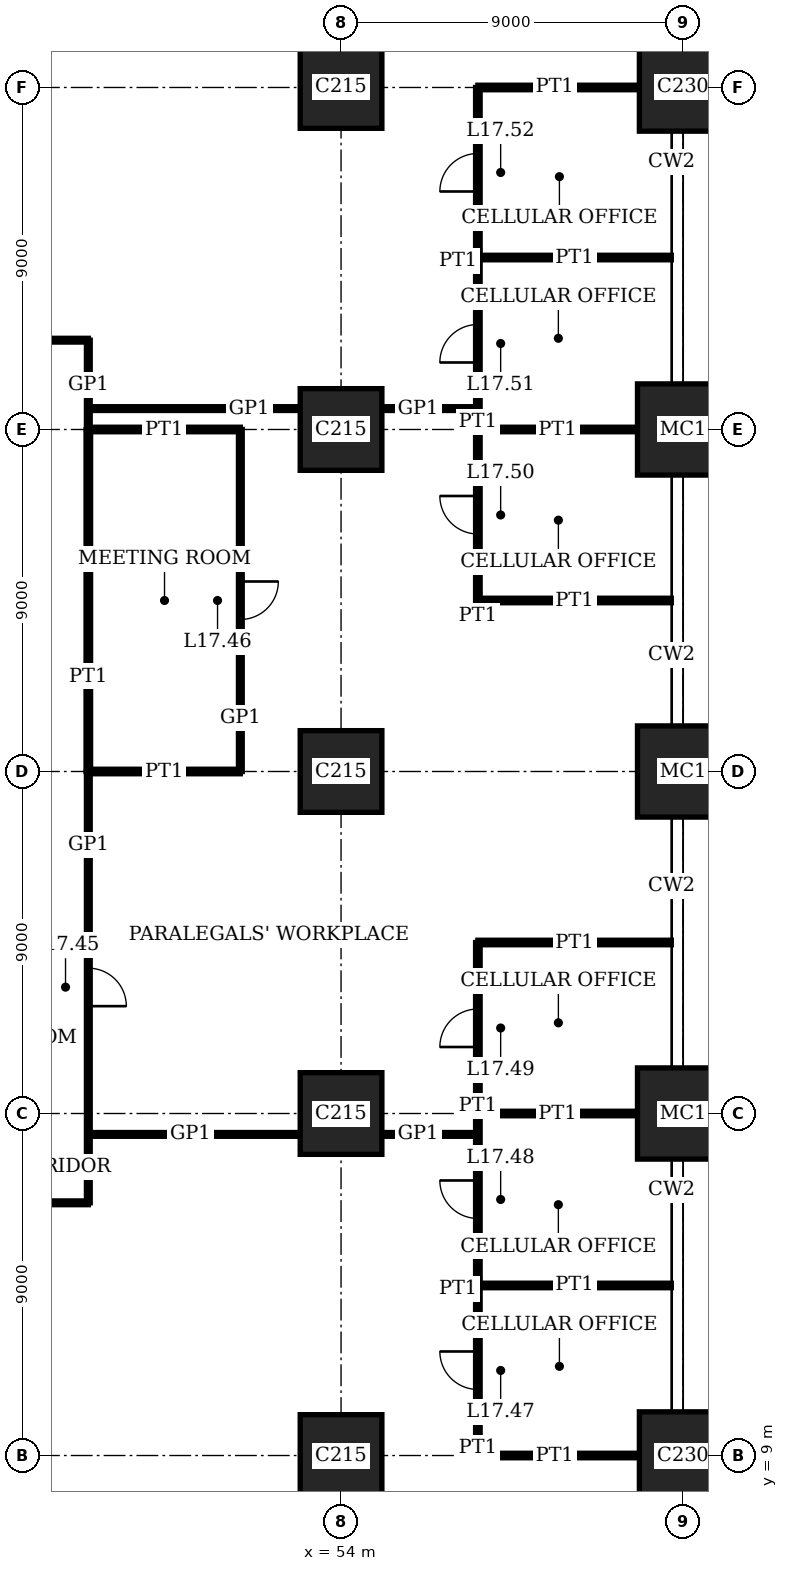
"""IFC4 building model, lengths in metres.
Left out: names, types, materials, properties, quantities, classifications, styles, units other than length and angle.
Written with IfcOpenShell. Run it as: python <this file> out.ifc"""

import sys

from ifc_helpers import new_model, si_unit, direction, frame, frame_2d, origin, origin_2d, place, context, subcontext, project, spatial, rectangle, extrude, element, fill, save


model = new_model("IFC4")
c1 = context("Model", 3, precision=1e-05, world=origin(), true_north=direction((0.0, 1.0)))
c2 = subcontext(c1, "Body", "Model", "MODEL_VIEW")
j1 = project(units=[si_unit("LENGTHUNIT", "METRE"), si_unit("PLANEANGLEUNIT", "RADIAN")], contexts=[c1])
p1 = place(None, origin())
s1 = spatial("IfcSite", under=j1, at=p1, CompositionType="ELEMENT")
p2 = place(p1, origin())
s2 = spatial("IfcBuilding", under=s1, at=p2, CompositionType="ELEMENT")
p3 = place(p2, frame((0.0, 0.0, 71.8)))
s3 = spatial("IfcBuildingStorey", under=s2, at=p3, CompositionType="ELEMENT", Elevation=71.8)
for number, where, z_axis, x_axis in (
    (1, (54.0, 9.0, 0.0), (0.0, 0.0, 1.0), (1.0, 0.0, 0.0)),
    (2, (54.0, 18.0, 0.0), (0.0, 0.0, 1.0), (1.0, 0.0, 0.0)),
    (3, (54.0, 27.0, 0.0), (0.0, 0.0, 1.0), (1.0, 0.0, 0.0)),
    (4, (54.0, 36.0, 0.0), (0.0, 0.0, 1.0), (1.0, 0.0, 0.0)),
    (5, (54.0, 45.0, 0.0), (0.0, 0.0, 1.0), (1.0, 0.0, 0.0)),
):
    element("IfcColumn", number, at=place(p3, frame(where, z_axis=z_axis, x_axis=x_axis)), inside=s3, PredefinedType="COLUMN", context=c2, shape_type="SweptSolid", body=[
        extrude(rectangle(XDim=2.15, YDim=2.15, at=origin_2d()), origin(), (0.0, 0.0, 1.0), 4.0),
    ])
p4 = place(p3, frame((63.0, 9.0, 0.0), z_axis=(0.0, 0.0, 1.0), x_axis=(1.0, 0.0, 0.0)))
e6 = element("IfcColumn", 6, at=p4, inside=s3, PredefinedType="COLUMN", context=c2, shape_type="SweptSolid", body=[
    extrude(rectangle(XDim=2.3, YDim=2.3, at=origin_2d()), origin(), (0.0, 0.0, 1.0), 4.0),
])
for number, where, z_axis, x_axis in (
    (7, (63.0, 18.0, 0.0), (0.0, 0.0, 1.0), (1.0, 0.0, 0.0)),
    (8, (63.0, 27.0, 0.0), (0.0, 0.0, 1.0), (1.0, 0.0, 0.0)),
    (9, (63.0, 36.0, 0.0), (0.0, 0.0, 1.0), (1.0, 0.0, 0.0)),
):
    element("IfcColumn", number, at=place(p3, frame(where, z_axis=z_axis, x_axis=x_axis)), inside=s3, PredefinedType="COLUMN", context=c2, shape_type="SweptSolid", body=[
        extrude(rectangle(XDim=2.4, YDim=2.4, at=origin_2d()), origin(), (0.0, 0.0, 1.0), 4.0),
    ])
p5 = place(p3, frame((63.0, 45.0, 0.0), z_axis=(0.0, 0.0, 1.0), x_axis=(1.0, 0.0, 0.0)))
e10 = element("IfcColumn", 10, at=p5, inside=s3, PredefinedType="COLUMN", context=c2, shape_type="SweptSolid", body=[
    extrude(rectangle(XDim=2.3, YDim=2.3, at=origin_2d()), origin(), (0.0, 0.0, 1.0), 4.0),
])
p6 = place(p3, frame((57.6, 9.0, 0.0), z_axis=(0.0, 0.0, 1.0), x_axis=(1.0, 0.0, 0.0)))
e11 = element("IfcWall", 11, at=p6, inside=s3, PredefinedType="PARTITIONING", context=c2, shape_type="SweptSolid", body=[
    extrude(rectangle(XDim=4.25, YDim=0.12, at=frame_2d((2.125, 0.0))), origin(), (0.0, 0.0, 1.0), 3.05),
])
p7 = place(p3, frame((57.6, 13.475, 0.0), z_axis=(0.0, 0.0, 1.0), x_axis=(1.0, 0.0, 0.0)))
e12 = element("IfcWall", 12, at=p7, inside=s3, PredefinedType="PARTITIONING", context=c2, shape_type="SweptSolid", body=[
    extrude(rectangle(XDim=5.09, YDim=0.12, at=frame_2d((2.545, 0.0))), origin(), (0.0, 0.0, 1.0), 3.1),
])
p8 = place(p3, frame((31.5, 15.65, 0.0), z_axis=(0.0, 0.0, 1.0), x_axis=(1.0, 0.0, 0.0)))
e13 = element("IfcWall", 13, at=p8, inside=s3, PredefinedType="PARTITIONING", context=c2, shape_type="SweptSolid", body=[
    extrude(rectangle(XDim=15.85, YDim=0.1, at=frame_2d((7.925, 0.0))), origin(), (0.0, 0.0, 1.0), 3.75),
])
p9 = place(p3, frame((47.35, 17.45, 0.0), z_axis=(0.0, 0.0, 1.0), x_axis=(1.0, 0.0, 0.0)))
e14 = element("IfcWall", 14, at=p9, inside=s3, PredefinedType="PARTITIONING", context=c2, shape_type="SweptSolid", body=[
    extrude(rectangle(XDim=5.575, YDim=0.1, at=frame_2d((2.788, 0.0))), origin(), (0.0, 0.0, 1.0), 3.05),
])
p10 = place(p3, frame((55.075, 17.45, 0.0), z_axis=(0.0, 0.0, 1.0), x_axis=(1.0, 0.0, 0.0)))
e15 = element("IfcWall", 15, at=p10, inside=s3, PredefinedType="PARTITIONING", context=c2, shape_type="SweptSolid", body=[
    extrude(rectangle(XDim=2.535, YDim=0.1, at=frame_2d((1.268, 0.0))), origin(), (0.0, 0.0, 1.0), 3.05),
])
p11 = place(p3, frame((57.6, 18.0, 0.0), z_axis=(0.0, 0.0, 1.0), x_axis=(1.0, 0.0, 0.0)))
e16 = element("IfcWall", 16, at=p11, inside=s3, PredefinedType="PARTITIONING", context=c2, shape_type="SweptSolid", body=[
    extrude(rectangle(XDim=4.2, YDim=0.12, at=frame_2d((2.1, 0.0))), origin(), (0.0, 0.0, 1.0), 3.05),
])
p12 = place(p3, frame((57.6, 22.5, 0.0), z_axis=(0.0, 0.0, 1.0), x_axis=(1.0, 0.0, 0.0)))
e17 = element("IfcWall", 17, at=p12, inside=s3, PredefinedType="PARTITIONING", context=c2, shape_type="SweptSolid", body=[
    extrude(rectangle(XDim=5.09, YDim=0.12, at=frame_2d((2.545, 0.0))), origin(), (0.0, 0.0, 1.0), 3.1),
])
p13 = place(p3, frame((47.35, 27.0, 0.0), z_axis=(0.0, 0.0, 1.0), x_axis=(1.0, 0.0, 0.0)))
e18 = element("IfcWall", 18, at=p13, inside=s3, PredefinedType="PARTITIONING", context=c2, shape_type="SweptSolid", body=[
    extrude(rectangle(XDim=4.0, YDim=0.12, at=frame_2d((2.0, 0.0))), origin(), (0.0, 0.0, 1.0), 3.05),
])
p14 = place(p3, frame((57.6, 31.5, 0.0), z_axis=(0.0, 0.0, 1.0), x_axis=(1.0, 0.0, 0.0)))
e19 = element("IfcWall", 19, at=p14, inside=s3, PredefinedType="PARTITIONING", context=c2, shape_type="SweptSolid", body=[
    extrude(rectangle(XDim=5.09, YDim=0.12, at=frame_2d((2.545, 0.0))), origin(), (0.0, 0.0, 1.0), 3.1),
])
p15 = place(p3, frame((57.6, 36.0, 0.0), z_axis=(0.0, 0.0, 1.0), x_axis=(1.0, 0.0, 0.0)))
e20 = element("IfcWall", 20, at=p15, inside=s3, PredefinedType="PARTITIONING", context=c2, shape_type="SweptSolid", body=[
    extrude(rectangle(XDim=4.2, YDim=0.12, at=frame_2d((2.1, 0.0))), origin(), (0.0, 0.0, 1.0), 3.05),
])
p16 = place(p3, frame((47.35, 36.0, 0.0), z_axis=(0.0, 0.0, 1.0), x_axis=(1.0, 0.0, 0.0)))
e21 = element("IfcWall", 21, at=p16, inside=s3, PredefinedType="PARTITIONING", context=c2, shape_type="SweptSolid", body=[
    extrude(rectangle(XDim=4.0, YDim=0.12, at=frame_2d((2.0, 0.0))), origin(), (0.0, 0.0, 1.0), 3.05),
])
p17 = place(p3, frame((47.35, 36.55, 0.0), z_axis=(0.0, 0.0, 1.0), x_axis=(1.0, 0.0, 0.0)))
e22 = element("IfcWall", 22, at=p17, inside=s3, PredefinedType="PARTITIONING", context=c2, shape_type="SweptSolid", body=[
    extrude(rectangle(XDim=5.575, YDim=0.1, at=frame_2d((2.788, 0.0))), origin(), (0.0, 0.0, 1.0), 3.05),
])
p18 = place(p3, frame((55.075, 36.55, 0.0), z_axis=(0.0, 0.0, 1.0), x_axis=(1.0, 0.0, 0.0)))
e23 = element("IfcWall", 23, at=p18, inside=s3, PredefinedType="PARTITIONING", context=c2, shape_type="SweptSolid", body=[
    extrude(rectangle(XDim=2.535, YDim=0.1, at=frame_2d((1.268, 0.0))), origin(), (0.0, 0.0, 1.0), 3.05),
])
p19 = place(p3, frame((40.5, 38.35, 0.0), z_axis=(0.0, 0.0, 1.0), x_axis=(1.0, 0.0, 0.0)))
e24 = element("IfcWall", 24, at=p19, inside=s3, PredefinedType="PARTITIONING", context=c2, shape_type="SweptSolid", body=[
    extrude(rectangle(XDim=6.85, YDim=0.1, at=frame_2d((3.425, 0.0))), origin(), (0.0, 0.0, 1.0), 3.75),
])
p20 = place(p3, frame((57.6, 40.525, 0.0), z_axis=(0.0, 0.0, 1.0), x_axis=(1.0, 0.0, 0.0)))
e25 = element("IfcWall", 25, at=p20, inside=s3, PredefinedType="PARTITIONING", context=c2, shape_type="SweptSolid", body=[
    extrude(rectangle(XDim=5.09, YDim=0.12, at=frame_2d((2.545, 0.0))), origin(), (0.0, 0.0, 1.0), 3.1),
])
p21 = place(p3, frame((57.6, 45.0, 0.0), z_axis=(0.0, 0.0, 1.0), x_axis=(1.0, 0.0, 0.0)))
e26 = element("IfcWall", 26, at=p21, inside=s3, PredefinedType="PARTITIONING", context=c2, shape_type="SweptSolid", body=[
    extrude(rectangle(XDim=4.25, YDim=0.12, at=frame_2d((2.125, 0.0))), origin(), (0.0, 0.0, 1.0), 3.05),
])
p22 = place(p3, frame((47.35, 27.0, 0.0), z_axis=(0.0, 0.0, 1.0), x_axis=(0.0, 1.0, 0.0)))
e27 = element("IfcWall", 27, at=p22, inside=s3, PredefinedType="PARTITIONING", context=c2, shape_type="SweptSolid", body=[
    extrude(rectangle(XDim=9.0, YDim=0.12, at=frame_2d((4.5, 0.0))), origin(), (0.0, 0.0, 1.0), 3.75),
])
p23 = place(p3, frame((47.35, 15.65, 0.0), z_axis=(0.0, 0.0, 1.0), x_axis=(0.0, 1.0, 0.0)))
e28 = element("IfcWall", 28, at=p23, inside=s3, PredefinedType="PARTITIONING", context=c2, shape_type="SweptSolid", body=[
    extrude(rectangle(XDim=11.35, YDim=0.1, at=frame_2d((5.675, 0.0))), origin(), (0.0, 0.0, 1.0), 3.75),
])
p24 = place(p23, frame((5.175, 0.0, 0.0)))
e29 = element("IfcOpeningElement", 29, at=p24, cuts=e28, PredefinedType="OPENING", context=c2, shape_type="SweptSolid", body=[
    extrude(rectangle(XDim=1.0, YDim=2.4, at=frame_2d((0.5, 1.2))), frame((0.0, 0.06, 0.0), z_axis=(0.0, -1.0, 0.0), x_axis=(1.0, 0.0, 0.0)), (0.0, 0.0, 1.0), 0.12),
])
p25 = place(p3, frame((47.35, 36.0, 0.0), z_axis=(0.0, 0.0, 1.0), x_axis=(0.0, 1.0, 0.0)))
e30 = element("IfcWall", 30, at=p25, inside=s3, PredefinedType="PARTITIONING", context=c2, shape_type="SweptSolid", body=[
    extrude(rectangle(XDim=2.35, YDim=0.1, at=frame_2d((1.175, 0.0))), origin(), (0.0, 0.0, 1.0), 3.75),
])
p26 = place(p3, frame((51.35, 27.0, 0.0), z_axis=(0.0, 0.0, 1.0), x_axis=(0.0, 1.0, 0.0)))
e31 = element("IfcWall", 31, at=p26, inside=s3, PredefinedType="PARTITIONING", context=c2, shape_type="SweptSolid", body=[
    extrude(rectangle(XDim=9.0, YDim=0.1, at=frame_2d((4.5, 0.0))), origin(), (0.0, 0.0, 1.0), 3.75),
])
p27 = place(p26, frame((4.0, 0.0, 0.0)))
e32 = element("IfcOpeningElement", 32, at=p27, cuts=e31, PredefinedType="OPENING", context=c2, shape_type="SweptSolid", body=[
    extrude(rectangle(XDim=1.0, YDim=2.4, at=frame_2d((0.5, 1.2))), frame((0.0, 0.06, 0.0), z_axis=(0.0, -1.0, 0.0), x_axis=(1.0, 0.0, 0.0)), (0.0, 0.0, 1.0), 0.12),
])
p28 = place(p3, frame((57.6, 9.0, 0.0), z_axis=(0.0, 0.0, 1.0), x_axis=(0.0, 1.0, 0.0)))
e33 = element("IfcWall", 33, at=p28, inside=s3, PredefinedType="PARTITIONING", context=c2, shape_type="SweptSolid", body=[
    extrude(rectangle(XDim=4.475, YDim=0.12, at=frame_2d((2.238, 0.0))), origin(), (0.0, 0.0, 1.0), 3.75),
])
p29 = place(p28, frame((1.738, 0.0, 0.0)))
e34 = element("IfcOpeningElement", 34, at=p29, cuts=e33, PredefinedType="OPENING", context=c2, shape_type="SweptSolid", body=[
    extrude(rectangle(XDim=1.0, YDim=2.4, at=frame_2d((0.5, 1.2))), frame((0.0, 0.07, 0.0), z_axis=(0.0, -1.0, 0.0), x_axis=(1.0, 0.0, 0.0)), (0.0, 0.0, 1.0), 0.14),
])
p30 = place(p3, frame((57.6, 13.475, 0.0), z_axis=(0.0, 0.0, 1.0), x_axis=(0.0, 1.0, 0.0)))
e35 = element("IfcWall", 35, at=p30, inside=s3, PredefinedType="PARTITIONING", context=c2, shape_type="SweptSolid", body=[
    extrude(rectangle(XDim=4.525, YDim=0.12, at=frame_2d((2.262, 0.0))), origin(), (0.0, 0.0, 1.0), 3.75),
])
p31 = place(p30, frame((1.763, 0.0, 0.0)))
e36 = element("IfcOpeningElement", 36, at=p31, cuts=e35, PredefinedType="OPENING", context=c2, shape_type="SweptSolid", body=[
    extrude(rectangle(XDim=1.0, YDim=2.4, at=frame_2d((0.5, 1.2))), frame((0.0, 0.07, 0.0), z_axis=(0.0, -1.0, 0.0), x_axis=(1.0, 0.0, 0.0)), (0.0, 0.0, 1.0), 0.14),
])
p32 = place(p3, frame((57.6, 18.0, 0.0), z_axis=(0.0, 0.0, 1.0), x_axis=(0.0, 1.0, 0.0)))
e37 = element("IfcWall", 37, at=p32, inside=s3, PredefinedType="PARTITIONING", context=c2, shape_type="SweptSolid", body=[
    extrude(rectangle(XDim=4.5, YDim=0.12, at=frame_2d((2.25, 0.0))), origin(), (0.0, 0.0, 1.0), 3.75),
])
p33 = place(p32, frame((1.75, 0.0, 0.0)))
e38 = element("IfcOpeningElement", 38, at=p33, cuts=e37, PredefinedType="OPENING", context=c2, shape_type="SweptSolid", body=[
    extrude(rectangle(XDim=1.0, YDim=2.4, at=frame_2d((0.5, 1.2))), frame((0.0, 0.07, 0.0), z_axis=(0.0, -1.0, 0.0), x_axis=(1.0, 0.0, 0.0)), (0.0, 0.0, 1.0), 0.14),
])
p34 = place(p3, frame((57.6, 31.5, 0.0), z_axis=(0.0, 0.0, 1.0), x_axis=(0.0, 1.0, 0.0)))
e39 = element("IfcWall", 39, at=p34, inside=s3, PredefinedType="PARTITIONING", context=c2, shape_type="SweptSolid", body=[
    extrude(rectangle(XDim=4.5, YDim=0.12, at=frame_2d((2.25, 0.0))), origin(), (0.0, 0.0, 1.0), 3.75),
])
p35 = place(p34, frame((1.75, 0.0, 0.0)))
e40 = element("IfcOpeningElement", 40, at=p35, cuts=e39, PredefinedType="OPENING", context=c2, shape_type="SweptSolid", body=[
    extrude(rectangle(XDim=1.0, YDim=2.4, at=frame_2d((0.5, 1.2))), frame((0.0, 0.07, 0.0), z_axis=(0.0, -1.0, 0.0), x_axis=(1.0, 0.0, 0.0)), (0.0, 0.0, 1.0), 0.14),
])
p36 = place(p3, frame((57.6, 36.0, 0.0), z_axis=(0.0, 0.0, 1.0), x_axis=(0.0, 1.0, 0.0)))
e41 = element("IfcWall", 41, at=p36, inside=s3, PredefinedType="PARTITIONING", context=c2, shape_type="SweptSolid", body=[
    extrude(rectangle(XDim=4.525, YDim=0.12, at=frame_2d((2.262, 0.0))), origin(), (0.0, 0.0, 1.0), 3.75),
])
p37 = place(p36, frame((1.763, 0.0, 0.0)))
e42 = element("IfcOpeningElement", 42, at=p37, cuts=e41, PredefinedType="OPENING", context=c2, shape_type="SweptSolid", body=[
    extrude(rectangle(XDim=1.0, YDim=2.4, at=frame_2d((0.5, 1.2))), frame((0.0, 0.07, 0.0), z_axis=(0.0, -1.0, 0.0), x_axis=(1.0, 0.0, 0.0)), (0.0, 0.0, 1.0), 0.14),
])
p38 = place(p3, frame((57.6, 40.525, 0.0), z_axis=(0.0, 0.0, 1.0), x_axis=(0.0, 1.0, 0.0)))
e43 = element("IfcWall", 43, at=p38, inside=s3, PredefinedType="PARTITIONING", context=c2, shape_type="SweptSolid", body=[
    extrude(rectangle(XDim=4.475, YDim=0.12, at=frame_2d((2.238, 0.0))), origin(), (0.0, 0.0, 1.0), 3.75),
])
p39 = place(p38, frame((1.738, 0.0, 0.0)))
e44 = element("IfcOpeningElement", 44, at=p39, cuts=e43, PredefinedType="OPENING", context=c2, shape_type="SweptSolid", body=[
    extrude(rectangle(XDim=1.0, YDim=2.4, at=frame_2d((0.5, 1.2))), frame((0.0, 0.07, 0.0), z_axis=(0.0, -1.0, 0.0), x_axis=(1.0, 0.0, 0.0)), (0.0, 0.0, 1.0), 0.14),
])
p40 = place(p24, origin())
e45 = element("IfcDoor", 45, at=p40, inside=s3, OperationType="SINGLE_SWING_LEFT", PredefinedType="DOOR", context=c2, shape_type="SweptSolid", body=[
    extrude(rectangle(XDim=1.0, YDim=2.4, at=frame_2d((0.5, 1.2))), frame((0.0, 0.02, 0.0), z_axis=(0.0, -1.0, 0.0), x_axis=(1.0, 0.0, 0.0)), (0.0, 0.0, 1.0), 0.04),
])
fill(e29, e45)
p41 = place(p27, origin())
e46 = element("IfcDoor", 46, at=p41, inside=s3, OperationType="SINGLE_SWING_RIGHT", PredefinedType="DOOR", context=c2, shape_type="SweptSolid", body=[
    extrude(rectangle(XDim=1.0, YDim=2.4, at=frame_2d((0.5, 1.2))), frame((0.0, 0.02, 0.0), z_axis=(0.0, -1.0, 0.0), x_axis=(1.0, 0.0, 0.0)), (0.0, 0.0, 1.0), 0.04),
])
fill(e32, e46)
p42 = place(p29, origin())
e47 = element("IfcDoor", 47, at=p42, inside=s3, OperationType="SINGLE_SWING_LEFT", PredefinedType="DOOR", context=c2, shape_type="SweptSolid", body=[
    extrude(rectangle(XDim=1.0, YDim=2.4, at=frame_2d((0.5, 1.2))), frame((0.0, 0.025, 0.0), z_axis=(0.0, -1.0, 0.0), x_axis=(1.0, 0.0, 0.0)), (0.0, 0.0, 1.0), 0.05),
])
fill(e34, e47)
p43 = place(p31, origin())
e48 = element("IfcDoor", 48, at=p43, inside=s3, OperationType="SINGLE_SWING_LEFT", PredefinedType="DOOR", context=c2, shape_type="SweptSolid", body=[
    extrude(rectangle(XDim=1.0, YDim=2.4, at=frame_2d((0.5, 1.2))), frame((0.0, 0.025, 0.0), z_axis=(0.0, -1.0, 0.0), x_axis=(1.0, 0.0, 0.0)), (0.0, 0.0, 1.0), 0.05),
])
fill(e36, e48)
p44 = place(p33, origin())
e49 = element("IfcDoor", 49, at=p44, inside=s3, OperationType="SINGLE_SWING_RIGHT", PredefinedType="DOOR", context=c2, shape_type="SweptSolid", body=[
    extrude(rectangle(XDim=1.0, YDim=2.4, at=frame_2d((0.5, 1.2))), frame((0.0, 0.025, 0.0), z_axis=(0.0, -1.0, 0.0), x_axis=(1.0, 0.0, 0.0)), (0.0, 0.0, 1.0), 0.05),
])
fill(e38, e49)
p45 = place(p35, origin())
e50 = element("IfcDoor", 50, at=p45, inside=s3, OperationType="SINGLE_SWING_LEFT", PredefinedType="DOOR", context=c2, shape_type="SweptSolid", body=[
    extrude(rectangle(XDim=1.0, YDim=2.4, at=frame_2d((0.5, 1.2))), frame((0.0, 0.025, 0.0), z_axis=(0.0, -1.0, 0.0), x_axis=(1.0, 0.0, 0.0)), (0.0, 0.0, 1.0), 0.05),
])
fill(e40, e50)
p46 = place(p37, origin())
e51 = element("IfcDoor", 51, at=p46, inside=s3, OperationType="SINGLE_SWING_RIGHT", PredefinedType="DOOR", context=c2, shape_type="SweptSolid", body=[
    extrude(rectangle(XDim=1.0, YDim=2.4, at=frame_2d((0.5, 1.2))), frame((0.0, 0.025, 0.0), z_axis=(0.0, -1.0, 0.0), x_axis=(1.0, 0.0, 0.0)), (0.0, 0.0, 1.0), 0.05),
])
fill(e42, e51)
p47 = place(p39, origin())
e52 = element("IfcDoor", 52, at=p47, inside=s3, OperationType="SINGLE_SWING_RIGHT", PredefinedType="DOOR", context=c2, shape_type="SweptSolid", body=[
    extrude(rectangle(XDim=1.0, YDim=2.4, at=frame_2d((0.5, 1.2))), frame((0.0, 0.025, 0.0), z_axis=(0.0, -1.0, 0.0), x_axis=(1.0, 0.0, 0.0)), (0.0, 0.0, 1.0), 0.05),
])
fill(e44, e52)
save(model, sys.argv[1])
